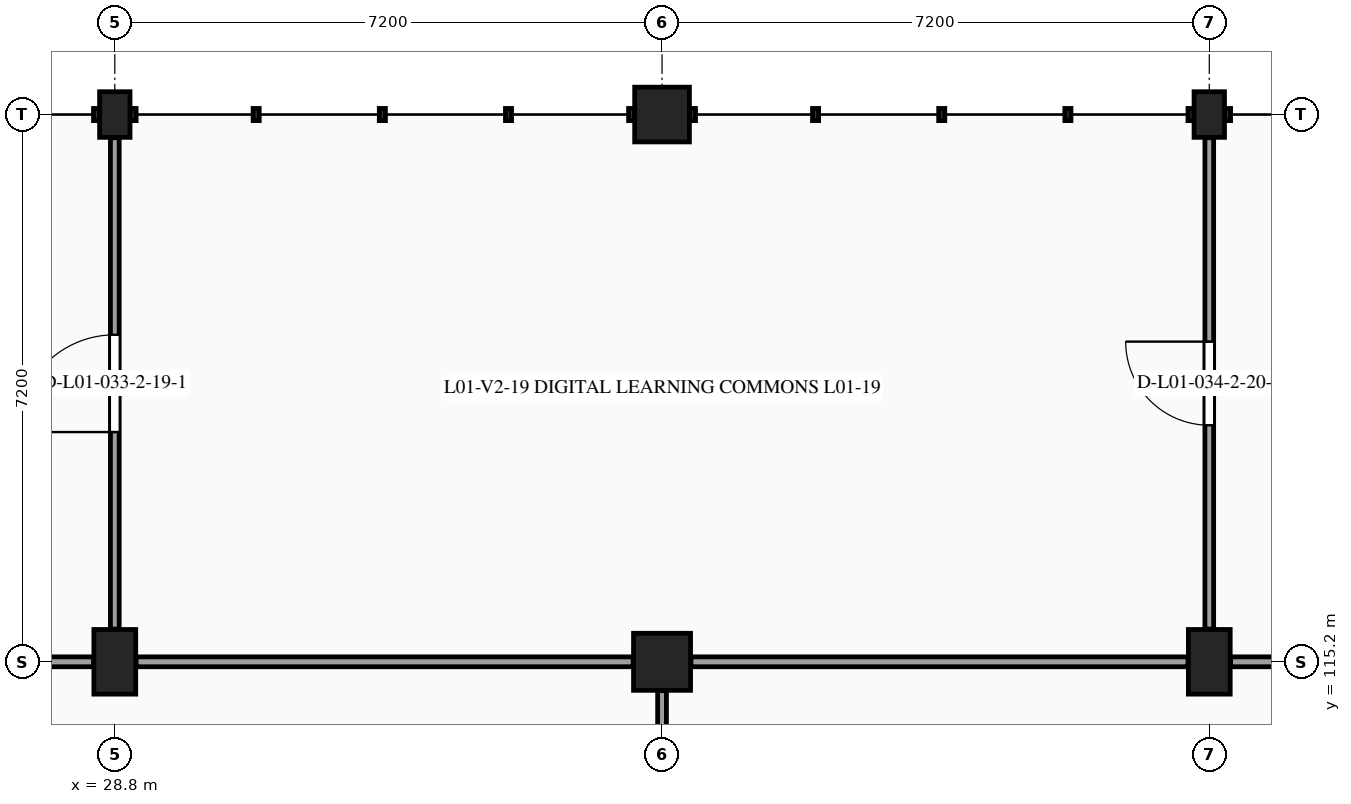
"""IFC4 building model, lengths in metres.
Left out: names, types, materials, properties, quantities, classifications, styles, units other than length and angle.
Written with IfcOpenShell. Run it as: python <this file> out.ifc"""

import sys

from ifc_helpers import new_model, si_unit, direction, frame, frame_2d, origin, origin_2d, place, context, subcontext, project, spatial, rectangle, extrude, element, fill, save


model = new_model("IFC4")
c1 = context("Model", 3, precision=1e-05, world=origin(), true_north=direction((0.0, 1.0)))
c2 = subcontext(c1, "Body", "Model", "MODEL_VIEW")
j1 = project(units=[si_unit("LENGTHUNIT", "METRE"), si_unit("PLANEANGLEUNIT", "RADIAN")], contexts=[c1])
p1 = place(None, origin())
s1 = spatial("IfcSite", under=j1, at=p1, CompositionType="ELEMENT")
p2 = place(p1, origin())
s2 = spatial("IfcBuilding", under=s1, at=p2, CompositionType="ELEMENT")
p3 = place(p2, frame((0.0, 0.0, 5.4)))
s3 = spatial("IfcBuildingStorey", under=s2, at=p3, CompositionType="ELEMENT", Elevation=5.4)
p4 = place(p3, frame((28.8, 115.2, 0.0), z_axis=(0.0, 0.0, 1.0), x_axis=(1.0, 0.0, 0.0)))
e1 = element("IfcColumn", 1, at=p4, inside=s3, PredefinedType="COLUMN", context=c2, shape_type="SweptSolid", body=[
    extrude(rectangle(XDim=0.55, YDim=0.85, at=origin_2d()), origin(), (0.0, 0.0, 1.0), 4.5),
])
p5 = place(p3, frame((28.8, 122.4, 0.0), z_axis=(0.0, 0.0, 1.0), x_axis=(1.0, 0.0, 0.0)))
e2 = element("IfcColumn", 2, at=p5, inside=s3, PredefinedType="PILASTER", context=c2, shape_type="SweptSolid", body=[
    extrude(rectangle(XDim=0.4, YDim=0.6, at=origin_2d()), origin(), (0.0, 0.0, 1.0), 4.5),
])
p6 = place(p3, frame((36.0, 115.2, 0.0), z_axis=(0.0, 0.0, 1.0), x_axis=(1.0, 0.0, 0.0)))
e3 = element("IfcColumn", 3, at=p6, inside=s3, PredefinedType="COLUMN", context=c2, shape_type="SweptSolid", body=[
    extrude(rectangle(XDim=0.75, YDim=0.75, at=origin_2d()), origin(), (0.0, 0.0, 1.0), 4.5),
])
p7 = place(p3, frame((36.0, 122.4, 0.0), z_axis=(0.0, 0.0, 1.0), x_axis=(1.0, 0.0, 0.0)))
e4 = element("IfcColumn", 4, at=p7, inside=s3, PredefinedType="COLUMN", context=c2, shape_type="SweptSolid", body=[
    extrude(rectangle(XDim=0.72, YDim=0.72, at=origin_2d()), origin(), (0.0, 0.0, 1.0), 4.5),
])
p8 = place(p3, frame((43.2, 115.2, 0.0), z_axis=(0.0, 0.0, 1.0), x_axis=(1.0, 0.0, 0.0)))
e5 = element("IfcColumn", 5, at=p8, inside=s3, PredefinedType="COLUMN", context=c2, shape_type="SweptSolid", body=[
    extrude(rectangle(XDim=0.55, YDim=0.85, at=origin_2d()), origin(), (0.0, 0.0, 1.0), 4.5),
])
p9 = place(p3, frame((43.2, 122.4, 0.0), z_axis=(0.0, 0.0, 1.0), x_axis=(1.0, 0.0, 0.0)))
e6 = element("IfcColumn", 6, at=p9, inside=s3, PredefinedType="PILASTER", context=c2, shape_type="SweptSolid", body=[
    extrude(rectangle(XDim=0.4, YDim=0.6, at=origin_2d()), origin(), (0.0, 0.0, 1.0), 4.5),
])
p10 = place(p3, frame((21.98, 115.2, 0.0), z_axis=(0.0, 0.0, 1.0), x_axis=(1.0, 0.0, 0.0)))
e7 = element("IfcWall", 7, at=p10, inside=s3, PredefinedType="PARTITIONING", context=c2, shape_type="SweptSolid", body=[
    extrude(rectangle(XDim=6.54, YDim=0.13, at=frame_2d((3.27, 0.0))), origin(), (0.0, 0.0, 1.0), 3.49),
])
p11 = place(p3, frame((28.8, 115.63, 0.0), z_axis=(0.0, 0.0, 1.0), x_axis=(0.0, 1.0, 0.0)))
e8 = element("IfcWall", 8, at=p11, inside=s3, PredefinedType="PARTITIONING", context=c2, shape_type="SweptSolid", body=[
    extrude(rectangle(XDim=6.465, YDim=0.115, at=frame_2d((3.232, 0.0))), origin(), (0.0, 0.0, 1.0), 3.52),
])
p12 = place(p11, frame((2.593, 0.0, 0.0)))
e9 = element("IfcOpeningElement", 9, at=p12, cuts=e8, PredefinedType="OPENING", context=c2, shape_type="SweptSolid", body=[
    extrude(rectangle(XDim=1.28, YDim=2.24, at=frame_2d((0.64, 1.12))), frame((0.0, 0.067, 0.0), z_axis=(0.0, -1.0, 0.0), x_axis=(1.0, 0.0, 0.0)), (0.0, 0.0, 1.0), 0.135),
])
p13 = place(p3, frame((36.0, 108.395, 0.0), z_axis=(0.0, 0.0, 1.0), x_axis=(0.0, 1.0, 0.0)))
e10 = element("IfcWall", 10, at=p13, inside=s3, PredefinedType="PARTITIONING", context=c2, shape_type="SweptSolid", body=[
    extrude(rectangle(XDim=6.425, YDim=0.115, at=frame_2d((3.212, 0.0))), origin(), (0.0, 0.0, 1.0), 3.525),
])
p14 = place(p13, frame((2.413, 0.0, 0.0)))
e11 = element("IfcOpeningElement", 11, at=p14, cuts=e10, PredefinedType="OPENING", context=c2, shape_type="SweptSolid", body=[
    extrude(rectangle(XDim=1.6, YDim=2.2, at=frame_2d((0.8, 1.1))), frame((0.0, 0.067, 0.0), z_axis=(0.0, -1.0, 0.0), x_axis=(1.0, 0.0, 0.0)), (0.0, 0.0, 1.0), 0.135),
])
p15 = place(p3, frame((29.08, 115.2, 0.0), z_axis=(0.0, 0.0, 1.0), x_axis=(1.0, 0.0, 0.0)))
e12 = element("IfcWall", 12, at=p15, inside=s3, PredefinedType="PARTITIONING", context=c2, shape_type="SweptSolid", body=[
    extrude(rectangle(XDim=6.54, YDim=0.13, at=frame_2d((3.27, 0.0))), origin(), (0.0, 0.0, 1.0), 3.51),
])
p16 = place(p3, frame((36.38, 115.2, 0.0), z_axis=(0.0, 0.0, 1.0), x_axis=(1.0, 0.0, 0.0)))
e13 = element("IfcWall", 13, at=p16, inside=s3, PredefinedType="PARTITIONING", context=c2, shape_type="SweptSolid", body=[
    extrude(rectangle(XDim=6.54, YDim=0.13, at=frame_2d((3.27, 0.0))), origin(), (0.0, 0.0, 1.0), 3.55),
])
p17 = place(p3, frame((43.2, 115.63, 0.0), z_axis=(0.0, 0.0, 1.0), x_axis=(0.0, 1.0, 0.0)))
e14 = element("IfcWall", 14, at=p17, inside=s3, PredefinedType="PARTITIONING", context=c2, shape_type="SweptSolid", body=[
    extrude(rectangle(XDim=6.465, YDim=0.115, at=frame_2d((3.232, 0.0))), origin(), (0.0, 0.0, 1.0), 3.52),
])
p18 = place(p17, frame((2.683, 0.0, 0.0)))
e15 = element("IfcOpeningElement", 15, at=p18, cuts=e14, PredefinedType="OPENING", context=c2, shape_type="SweptSolid", body=[
    extrude(rectangle(XDim=1.1, YDim=2.15, at=frame_2d((0.55, 1.075))), frame((0.0, 0.067, 0.0), z_axis=(0.0, -1.0, 0.0), x_axis=(1.0, 0.0, 0.0)), (0.0, 0.0, 1.0), 0.135),
])
p19 = place(p3, frame((43.48, 115.2, 0.0), z_axis=(0.0, 0.0, 1.0), x_axis=(1.0, 0.0, 0.0)))
e16 = element("IfcWall", 16, at=p19, inside=s3, PredefinedType="PARTITIONING", context=c2, shape_type="SweptSolid", body=[
    extrude(rectangle(XDim=6.54, YDim=0.13, at=frame_2d((3.27, 0.0))), origin(), (0.0, 0.0, 1.0), 3.56),
])
p20 = place(p12, origin())
e17 = element("IfcDoor", 17, at=p20, inside=s3, OperationType="SINGLE_SWING_LEFT", PredefinedType="DOOR", context=c2, shape_type="SweptSolid", body=[
    extrude(rectangle(XDim=1.28, YDim=2.24, at=frame_2d((0.64, 1.12))), frame((0.0, 0.025, 0.0), z_axis=(0.0, -1.0, 0.0), x_axis=(1.0, 0.0, 0.0)), (0.0, 0.0, 1.0), 0.05),
])
fill(e9, e17)
p21 = place(p18, origin())
e18 = element("IfcDoor", 18, at=p21, inside=s3, OperationType="SINGLE_SWING_RIGHT", PredefinedType="DOOR", context=c2, shape_type="SweptSolid", body=[
    extrude(rectangle(XDim=1.1, YDim=2.15, at=frame_2d((0.55, 1.075))), frame((0.0, 0.025, 0.0), z_axis=(0.0, -1.0, 0.0), x_axis=(1.0, 0.0, 0.0)), (0.0, 0.0, 1.0), 0.05),
])
fill(e15, e18)
save(model, sys.argv[1])
